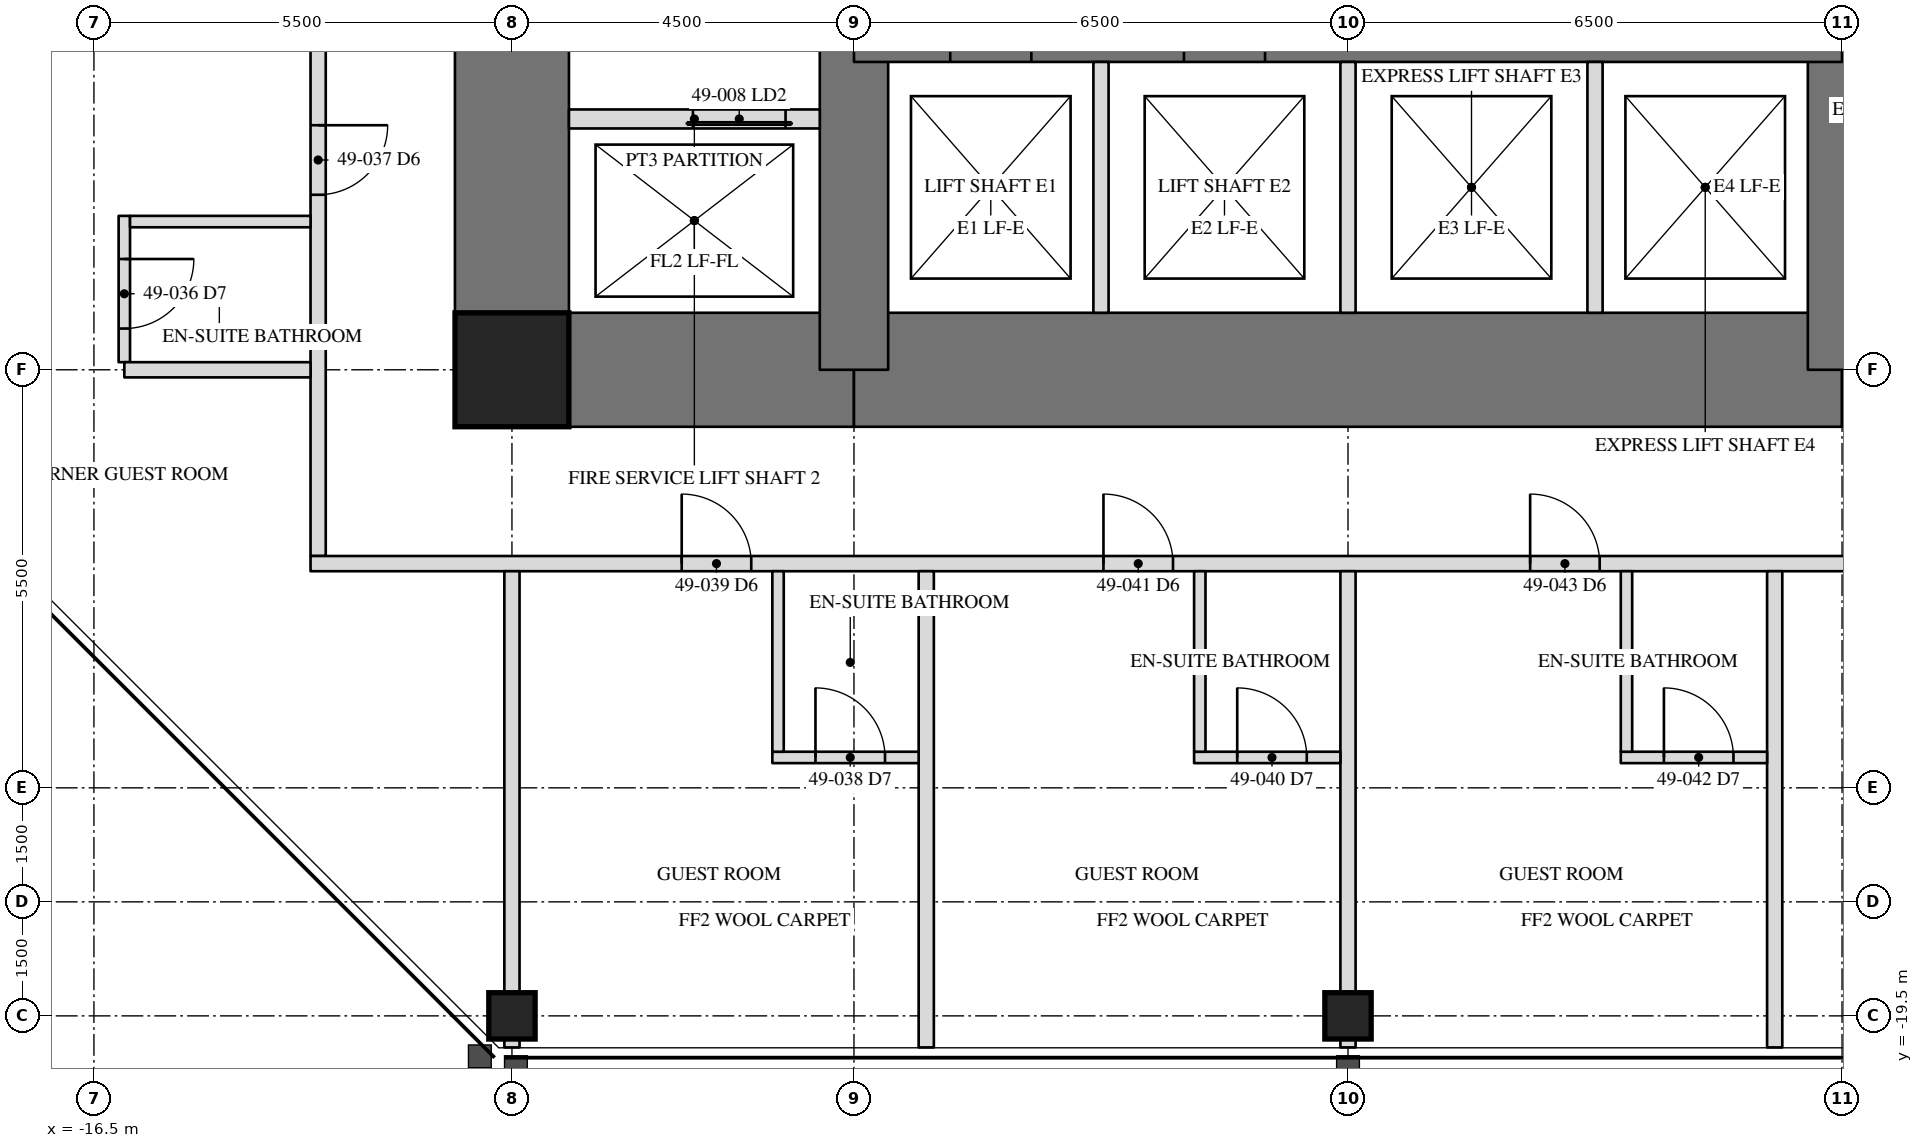
"""IFC4 building model, lengths in metres.
Left out: names, types, materials, properties, quantities, classifications, styles, units other than length and angle.
Written with IfcOpenShell. Run it as: python <this file> out.ifc"""

import sys

from ifc_helpers import new_model, si_unit, direction, frame, frame_2d, origin, origin_2d, place, context, subcontext, project, spatial, rectangle, hollow_rectangle, extrude, element, fill, save


model = new_model("IFC4")
c1 = context("Model", 3, precision=1e-05, world=origin(), true_north=direction((0.0, 1.0)))
c2 = subcontext(c1, "Body", "Model", "MODEL_VIEW")
j1 = project(units=[si_unit("LENGTHUNIT", "METRE"), si_unit("PLANEANGLEUNIT", "RADIAN")], contexts=[c1])
p1 = place(None, origin())
s1 = spatial("IfcSite", under=j1, at=p1, CompositionType="ELEMENT")
p2 = place(p1, origin())
s2 = spatial("IfcBuilding", under=s1, at=p2, CompositionType="ELEMENT")
p3 = place(p2, frame((0.0, 0.0, 208.2)))
s3 = spatial("IfcBuildingStorey", under=s2, at=p3, CompositionType="ELEMENT", Elevation=208.2)
for number, where, z_axis, x_axis in (
    (1, (-11.0, -19.5, 0.0), (0.0, 0.0, 1.0), (1.0, 0.0, 0.0)),
    (2, (0.0, -19.5, 0.0), (0.0, 0.0, 1.0), (1.0, 0.0, 0.0)),
):
    element("IfcColumn", number, at=place(p3, frame(where, z_axis=z_axis, x_axis=x_axis)), inside=s3, PredefinedType="COLUMN", context=c2, shape_type="SweptSolid", body=[
        extrude(hollow_rectangle(XDim=0.61, YDim=0.61, WallThickness=0.076, at=origin_2d()), origin(), (0.0, 0.0, 1.0), 3.5),
    ])
p4 = place(p3, frame((-11.0, 11.0, 0.0), z_axis=(0.0, 0.0, 1.0), x_axis=(0.0, -1.0, 0.0)))
e3 = element("IfcWall", 3, at=p4, inside=s3, PredefinedType="SHEAR", context=c2, shape_type="SweptSolid", body=[
    extrude(rectangle(XDim=22.0, YDim=1.5, at=frame_2d((11.0, 0.0))), origin(), (0.0, 0.0, 1.0), 3.5),
])
p5 = place(p4, frame((15.393, 0.0, 0.0)))
e4 = element("IfcOpeningElement", 4, at=p5, cuts=e3, PredefinedType="OPENING", context=c2, shape_type="SweptSolid", body=[
    extrude(rectangle(XDim=0.915, YDim=2.134, at=frame_2d((0.458, 1.067))), frame((0.0, 0.76, 0.0), z_axis=(0.0, -1.0, 0.0), x_axis=(1.0, 0.0, 0.0)), (0.0, 0.0, 1.0), 1.52),
])
p6 = place(p3, frame((-11.0, -11.0, 0.0), z_axis=(0.0, 0.0, 1.0), x_axis=(1.0, 0.0, 0.0)))
e5 = element("IfcWall", 5, at=p6, inside=s3, PredefinedType="SHEAR", context=c2, shape_type="SweptSolid", body=[
    extrude(rectangle(XDim=4.5, YDim=1.5, at=frame_2d((2.25, 0.0))), origin(), (0.0, 0.0, 1.0), 3.5),
])
p7 = place(p3, frame((-6.5, -11.0, 0.0), z_axis=(0.0, 0.0, 1.0), x_axis=(1.0, 0.0, 0.0)))
e6 = element("IfcWall", 6, at=p7, inside=s3, PredefinedType="SHEAR", context=c2, shape_type="SweptSolid", body=[
    extrude(rectangle(XDim=13.0, YDim=1.5, at=frame_2d((6.5, 0.0))), origin(), (0.0, 0.0, 1.0), 3.5),
])
p8 = place(p3, frame((6.5, -11.0, 0.0), z_axis=(0.0, 0.0, 1.0), x_axis=(1.0, 0.0, 0.0)))
e7 = element("IfcWall", 7, at=p8, inside=s3, PredefinedType="SHEAR", context=c2, shape_type="SweptSolid", body=[
    extrude(rectangle(XDim=4.5, YDim=1.5, at=frame_2d((2.25, 0.0))), origin(), (0.0, 0.0, 1.0), 3.5),
])
for number, where, z_axis, x_axis in (
    (8, (6.5, -11.0, 0.0), (0.0, 0.0, 1.0), (0.0, 1.0, 0.0)),
    (9, (-6.5, -6.5, 0.0), (0.0, 0.0, 1.0), (0.0, -1.0, 0.0)),
):
    element("IfcWall", number, at=place(p3, frame(where, z_axis=z_axis, x_axis=x_axis)), inside=s3, PredefinedType="SHEAR", context=c2, shape_type="SweptSolid", body=[
        extrude(rectangle(XDim=4.5, YDim=0.9, at=frame_2d((2.25, 0.0))), origin(), (0.0, 0.0, 1.0), 3.5),
    ])
p9 = place(p3, frame((-6.5, -6.5, 0.0), z_axis=(0.0, 0.0, 1.0), x_axis=(1.0, 0.0, 0.0)))
e10 = element("IfcWall", 10, at=p9, inside=s3, PredefinedType="SHEAR", context=c2, shape_type="SweptSolid", body=[
    extrude(rectangle(XDim=13.0, YDim=0.9, at=frame_2d((6.5, 0.0))), origin(), (0.0, 0.0, 1.0), 3.5),
])
p10 = place(p9, frame((1.267, 0.0, 0.0)))
e11 = element("IfcOpeningElement", 11, at=p10, cuts=e10, PredefinedType="OPENING", context=c2, shape_type="SweptSolid", body=[
    extrude(rectangle(XDim=1.067, YDim=2.134, at=frame_2d((0.533, 1.067))), frame((0.0, 0.46, 0.0), z_axis=(0.0, -1.0, 0.0), x_axis=(1.0, 0.0, 0.0)), (0.0, 0.0, 1.0), 0.92),
])
p11 = place(p9, frame((4.342, 0.0, 0.0)))
e12 = element("IfcOpeningElement", 12, at=p11, cuts=e10, PredefinedType="OPENING", context=c2, shape_type="SweptSolid", body=[
    extrude(rectangle(XDim=1.067, YDim=2.134, at=frame_2d((0.533, 1.067))), frame((0.0, 0.46, 0.0), z_axis=(0.0, -1.0, 0.0), x_axis=(1.0, 0.0, 0.0)), (0.0, 0.0, 1.0), 0.92),
])
p12 = place(p3, frame((-11.0, -11.0, 0.0), z_axis=(0.0, 0.0, 1.0), x_axis=(1.0, 0.0, 0.0)))
e13 = element("IfcColumn", 13, at=p12, inside=s3, PredefinedType="COLUMN", context=c2, shape_type="SweptSolid", body=[
    extrude(hollow_rectangle(XDim=1.499, YDim=1.499, WallThickness=0.102, at=origin_2d()), origin(), (0.0, 0.0, 1.0), 3.5),
])
p13 = place(p3, frame((-6.95, -7.7, 0.0), z_axis=(0.0, 0.0, 1.0), x_axis=(-1.0, 0.0, 0.0)))
e14 = element("IfcWall", 14, at=p13, inside=s3, PredefinedType="PARTITIONING", context=c2, shape_type="SweptSolid", body=[
    extrude(rectangle(XDim=3.3, YDim=0.25, at=frame_2d((1.65, 0.0))), origin(), (0.0, 0.0, 1.0), 3.31),
])
p14 = place(p13, frame((0.45, 0.0, 0.0)))
e15 = element("IfcOpeningElement", 15, at=p14, cuts=e14, PredefinedType="OPENING", context=c2, shape_type="SweptSolid", body=[
    extrude(rectangle(XDim=1.219, YDim=2.134, at=frame_2d((0.609, 1.067))), frame((0.0, 0.135, 0.0), z_axis=(0.0, -1.0, 0.0), x_axis=(1.0, 0.0, 0.0)), (0.0, 0.0, 1.0), 0.27),
])
for number, where, z_axis, x_axis in (
    (16, (-3.25, -10.25, 0.0), (0.0, 0.0, 1.0), (0.0, 1.0, 0.0)),
    (17, (0.0, -10.25, 0.0), (0.0, 0.0, 1.0), (0.0, 1.0, 0.0)),
    (18, (3.25, -10.25, 0.0), (0.0, 0.0, 1.0), (0.0, 1.0, 0.0)),
):
    element("IfcWall", number, at=place(p3, frame(where, z_axis=z_axis, x_axis=x_axis)), inside=s3, PredefinedType="PARTITIONING", context=c2, shape_type="SweptSolid", body=[
        extrude(rectangle(XDim=3.3, YDim=0.2, at=frame_2d((1.65, 0.0))), origin(), (0.0, 0.0, 1.0), 3.31),
    ])
p15 = place(p3, frame((-13.55, 13.65, 0.0), z_axis=(0.0, 0.0, 1.0), x_axis=(0.0, -1.0, 0.0)))
e19 = element("IfcWall", 19, at=p15, inside=s3, PredefinedType="PARTITIONING", context=c2, shape_type="SweptSolid", body=[
    extrude(rectangle(XDim=27.1, YDim=0.2, at=frame_2d((13.55, 0.0))), origin(), (0.0, 0.0, 1.0), 3.31),
])
p16 = place(p15, frame((4.884, 0.0, 0.0)))
e20 = element("IfcOpeningElement", 20, at=p16, cuts=e19, PredefinedType="OPENING", context=c2, shape_type="SweptSolid", body=[
    extrude(rectangle(XDim=0.915, YDim=2.134, at=frame_2d((0.458, 1.067))), frame((0.0, 0.11, 0.0), z_axis=(0.0, -1.0, 0.0), x_axis=(1.0, 0.0, 0.0)), (0.0, 0.0, 1.0), 0.22),
])
p17 = place(p15, frame((10.433, 0.0, 0.0)))
e21 = element("IfcOpeningElement", 21, at=p17, cuts=e19, PredefinedType="OPENING", context=c2, shape_type="SweptSolid", body=[
    extrude(rectangle(XDim=0.915, YDim=2.134, at=frame_2d((0.458, 1.067))), frame((0.0, 0.11, 0.0), z_axis=(0.0, -1.0, 0.0), x_axis=(1.0, 0.0, 0.0)), (0.0, 0.0, 1.0), 0.22),
])
p18 = place(p15, frame((16.046, 0.0, 0.0)))
e22 = element("IfcOpeningElement", 22, at=p18, cuts=e19, PredefinedType="OPENING", context=c2, shape_type="SweptSolid", body=[
    extrude(rectangle(XDim=0.915, YDim=2.134, at=frame_2d((0.458, 1.067))), frame((0.0, 0.11, 0.0), z_axis=(0.0, -1.0, 0.0), x_axis=(1.0, 0.0, 0.0)), (0.0, 0.0, 1.0), 0.22),
])
p19 = place(p15, frame((21.433, 0.0, 0.0)))
e23 = element("IfcOpeningElement", 23, at=p19, cuts=e19, PredefinedType="OPENING", context=c2, shape_type="SweptSolid", body=[
    extrude(rectangle(XDim=0.915, YDim=2.134, at=frame_2d((0.458, 1.067))), frame((0.0, 0.11, 0.0), z_axis=(0.0, -1.0, 0.0), x_axis=(1.0, 0.0, 0.0)), (0.0, 0.0, 1.0), 0.22),
])
p20 = place(p3, frame((-13.65, -13.55, 0.0), z_axis=(0.0, 0.0, 1.0), x_axis=(1.0, 0.0, 0.0)))
e24 = element("IfcWall", 24, at=p20, inside=s3, PredefinedType="PARTITIONING", context=c2, shape_type="SweptSolid", body=[
    extrude(rectangle(XDim=27.1, YDim=0.2, at=frame_2d((13.55, 0.0))), origin(), (0.0, 0.0, 1.0), 3.31),
])
p21 = place(p20, frame((4.884, 0.0, 0.0)))
e25 = element("IfcOpeningElement", 25, at=p21, cuts=e24, PredefinedType="OPENING", context=c2, shape_type="SweptSolid", body=[
    extrude(rectangle(XDim=0.915, YDim=2.134, at=frame_2d((0.458, 1.067))), frame((0.0, 0.11, 0.0), z_axis=(0.0, -1.0, 0.0), x_axis=(1.0, 0.0, 0.0)), (0.0, 0.0, 1.0), 0.22),
])
p22 = place(p20, frame((10.433, 0.0, 0.0)))
e26 = element("IfcOpeningElement", 26, at=p22, cuts=e24, PredefinedType="OPENING", context=c2, shape_type="SweptSolid", body=[
    extrude(rectangle(XDim=0.915, YDim=2.134, at=frame_2d((0.458, 1.067))), frame((0.0, 0.11, 0.0), z_axis=(0.0, -1.0, 0.0), x_axis=(1.0, 0.0, 0.0)), (0.0, 0.0, 1.0), 0.22),
])
p23 = place(p20, frame((16.046, 0.0, 0.0)))
e27 = element("IfcOpeningElement", 27, at=p23, cuts=e24, PredefinedType="OPENING", context=c2, shape_type="SweptSolid", body=[
    extrude(rectangle(XDim=0.915, YDim=2.134, at=frame_2d((0.458, 1.067))), frame((0.0, 0.11, 0.0), z_axis=(0.0, -1.0, 0.0), x_axis=(1.0, 0.0, 0.0)), (0.0, 0.0, 1.0), 0.22),
])
p24 = place(p20, frame((21.433, 0.0, 0.0)))
e28 = element("IfcOpeningElement", 28, at=p24, cuts=e24, PredefinedType="OPENING", context=c2, shape_type="SweptSolid", body=[
    extrude(rectangle(XDim=0.915, YDim=2.134, at=frame_2d((0.458, 1.067))), frame((0.0, 0.11, 0.0), z_axis=(0.0, -1.0, 0.0), x_axis=(1.0, 0.0, 0.0)), (0.0, 0.0, 1.0), 0.22),
])
p25 = place(p3, frame((-16.1, -8.975, 0.0), z_axis=(0.0, 0.0, 1.0), x_axis=(0.0, -1.0, 0.0)))
e29 = element("IfcWall", 29, at=p25, inside=s3, PredefinedType="PARTITIONING", context=c2, shape_type="SweptSolid", body=[
    extrude(rectangle(XDim=1.925, YDim=0.15, at=frame_2d((0.962, 0.0))), origin(), (0.0, 0.0, 1.0), 3.31),
])
p26 = place(p25, frame((0.567, 0.0, 0.0)))
e30 = element("IfcOpeningElement", 30, at=p26, cuts=e29, PredefinedType="OPENING", context=c2, shape_type="SweptSolid", body=[
    extrude(rectangle(XDim=0.915, YDim=2.032, at=frame_2d((0.458, 1.016))), frame((0.0, 0.085, 0.0), z_axis=(0.0, -1.0, 0.0), x_axis=(1.0, 0.0, 0.0)), (0.0, 0.0, 1.0), 0.17),
])
p27 = place(p3, frame((-13.65, -9.05, 0.0), z_axis=(0.0, 0.0, 1.0), x_axis=(-1.0, 0.0, 0.0)))
e31 = element("IfcWall", 31, at=p27, inside=s3, PredefinedType="PARTITIONING", context=c2, shape_type="SweptSolid", body=[
    extrude(rectangle(XDim=2.375, YDim=0.15, at=frame_2d((1.188, 0.0))), origin(), (0.0, 0.0, 1.0), 3.31),
])
p28 = place(p3, frame((-13.65, -11.0, 0.0), z_axis=(0.0, 0.0, 1.0), x_axis=(-1.0, 0.0, 0.0)))
e32 = element("IfcWall", 32, at=p28, inside=s3, PredefinedType="PARTITIONING", context=c2, shape_type="SweptSolid", body=[
    extrude(rectangle(XDim=2.45, YDim=0.2, at=frame_2d((1.225, 0.0))), origin(), (0.0, 0.0, 1.0), 2.802),
])
p29 = place(p3, frame((-11.0, -13.65, 0.0), z_axis=(0.0, 0.0, 1.0), x_axis=(0.0, -1.0, 0.0)))
e33 = element("IfcWall", 33, at=p29, inside=s3, PredefinedType="PARTITIONING", context=c2, shape_type="SweptSolid", body=[
    extrude(rectangle(XDim=6.265, YDim=0.2, at=frame_2d((3.133, 0.0))), origin(), (0.0, 0.0, 1.0), 2.802),
])
p30 = place(p3, frame((-5.549, -13.65, 0.0), z_axis=(0.0, 0.0, 1.0), x_axis=(0.0, -1.0, 0.0)))
e34 = element("IfcWall", 34, at=p30, inside=s3, PredefinedType="PARTITIONING", context=c2, shape_type="SweptSolid", body=[
    extrude(rectangle(XDim=6.265, YDim=0.2, at=frame_2d((3.133, 0.0))), origin(), (0.0, 0.0, 1.0), 3.31),
])
p31 = place(p3, frame((0.0, -13.65, 0.0), z_axis=(0.0, 0.0, 1.0), x_axis=(0.0, -1.0, 0.0)))
e35 = element("IfcWall", 35, at=p31, inside=s3, PredefinedType="PARTITIONING", context=c2, shape_type="SweptSolid", body=[
    extrude(rectangle(XDim=6.265, YDim=0.2, at=frame_2d((3.133, 0.0))), origin(), (0.0, 0.0, 1.0), 2.802),
])
p32 = place(p3, frame((5.614, -13.65, 0.0), z_axis=(0.0, 0.0, 1.0), x_axis=(0.0, -1.0, 0.0)))
e36 = element("IfcWall", 36, at=p32, inside=s3, PredefinedType="PARTITIONING", context=c2, shape_type="SweptSolid", body=[
    extrude(rectangle(XDim=6.265, YDim=0.2, at=frame_2d((3.133, 0.0))), origin(), (0.0, 0.0, 1.0), 3.31),
])
p33 = place(p3, frame((-7.574, -16.1, 0.0), z_axis=(0.0, 0.0, 1.0), x_axis=(1.0, 0.0, 0.0)))
e37 = element("IfcWall", 37, at=p33, inside=s3, PredefinedType="PARTITIONING", context=c2, shape_type="SweptSolid", body=[
    extrude(rectangle(XDim=1.925, YDim=0.15, at=frame_2d((0.962, 0.0))), origin(), (0.0, 0.0, 1.0), 3.31),
])
p34 = place(p33, frame((0.567, 0.0, 0.0)))
e38 = element("IfcOpeningElement", 38, at=p34, cuts=e37, PredefinedType="OPENING", context=c2, shape_type="SweptSolid", body=[
    extrude(rectangle(XDim=0.915, YDim=2.032, at=frame_2d((0.458, 1.016))), frame((0.0, 0.085, 0.0), z_axis=(0.0, -1.0, 0.0), x_axis=(1.0, 0.0, 0.0)), (0.0, 0.0, 1.0), 0.17),
])
p35 = place(p3, frame((-7.499, -13.65, 0.0), z_axis=(0.0, 0.0, 1.0), x_axis=(0.0, -1.0, 0.0)))
e39 = element("IfcWall", 39, at=p35, inside=s3, PredefinedType="PARTITIONING", context=c2, shape_type="SweptSolid", body=[
    extrude(rectangle(XDim=2.375, YDim=0.15, at=frame_2d((1.188, 0.0))), origin(), (0.0, 0.0, 1.0), 3.31),
])
p36 = place(p3, frame((-2.025, -16.1, 0.0), z_axis=(0.0, 0.0, 1.0), x_axis=(1.0, 0.0, 0.0)))
e40 = element("IfcWall", 40, at=p36, inside=s3, PredefinedType="PARTITIONING", context=c2, shape_type="SweptSolid", body=[
    extrude(rectangle(XDim=1.925, YDim=0.15, at=frame_2d((0.962, 0.0))), origin(), (0.0, 0.0, 1.0), 3.31),
])
p37 = place(p36, frame((0.567, 0.0, 0.0)))
e41 = element("IfcOpeningElement", 41, at=p37, cuts=e40, PredefinedType="OPENING", context=c2, shape_type="SweptSolid", body=[
    extrude(rectangle(XDim=0.915, YDim=2.032, at=frame_2d((0.458, 1.016))), frame((0.0, 0.085, 0.0), z_axis=(0.0, -1.0, 0.0), x_axis=(1.0, 0.0, 0.0)), (0.0, 0.0, 1.0), 0.17),
])
p38 = place(p3, frame((-1.95, -13.65, 0.0), z_axis=(0.0, 0.0, 1.0), x_axis=(0.0, -1.0, 0.0)))
e42 = element("IfcWall", 42, at=p38, inside=s3, PredefinedType="PARTITIONING", context=c2, shape_type="SweptSolid", body=[
    extrude(rectangle(XDim=2.375, YDim=0.15, at=frame_2d((1.188, 0.0))), origin(), (0.0, 0.0, 1.0), 3.31),
])
p39 = place(p3, frame((3.589, -16.1, 0.0), z_axis=(0.0, 0.0, 1.0), x_axis=(1.0, 0.0, 0.0)))
e43 = element("IfcWall", 43, at=p39, inside=s3, PredefinedType="PARTITIONING", context=c2, shape_type="SweptSolid", body=[
    extrude(rectangle(XDim=1.925, YDim=0.15, at=frame_2d((0.962, 0.0))), origin(), (0.0, 0.0, 1.0), 3.31),
])
p40 = place(p39, frame((0.567, 0.0, 0.0)))
e44 = element("IfcOpeningElement", 44, at=p40, cuts=e43, PredefinedType="OPENING", context=c2, shape_type="SweptSolid", body=[
    extrude(rectangle(XDim=0.915, YDim=2.032, at=frame_2d((0.458, 1.016))), frame((0.0, 0.085, 0.0), z_axis=(0.0, -1.0, 0.0), x_axis=(1.0, 0.0, 0.0)), (0.0, 0.0, 1.0), 0.17),
])
p41 = place(p3, frame((3.664, -13.65, 0.0), z_axis=(0.0, 0.0, 1.0), x_axis=(0.0, -1.0, 0.0)))
e45 = element("IfcWall", 45, at=p41, inside=s3, PredefinedType="PARTITIONING", context=c2, shape_type="SweptSolid", body=[
    extrude(rectangle(XDim=2.375, YDim=0.15, at=frame_2d((1.188, 0.0))), origin(), (0.0, 0.0, 1.0), 2.703),
])
p42 = place(p14, origin())
e46 = element("IfcDoor", 46, at=p42, inside=s3, OperationType="SLIDING_TO_LEFT", PredefinedType="DOOR", context=c2, shape_type="SweptSolid", body=[
    extrude(rectangle(XDim=1.219, YDim=2.134, at=frame_2d((0.609, 1.067))), frame((0.0, 0.025, 0.0), z_axis=(0.0, -1.0, 0.0), x_axis=(1.0, 0.0, 0.0)), (0.0, 0.0, 1.0), 0.05),
])
fill(e15, e46)
p43 = place(p10, origin())
e47 = element("IfcDoor", 47, at=p43, inside=s3, OperationType="SLIDING_TO_LEFT", PredefinedType="DOOR", context=c2, shape_type="SweptSolid", body=[
    extrude(rectangle(XDim=1.067, YDim=2.134, at=frame_2d((0.533, 1.067))), frame((0.0, -0.375, 0.0), z_axis=(0.0, -1.0, 0.0), x_axis=(1.0, 0.0, 0.0)), (0.0, 0.0, 1.0), 0.05),
])
fill(e11, e47)
p44 = place(p11, origin())
e48 = element("IfcDoor", 48, at=p44, inside=s3, OperationType="SLIDING_TO_LEFT", PredefinedType="DOOR", context=c2, shape_type="SweptSolid", body=[
    extrude(rectangle(XDim=1.067, YDim=2.134, at=frame_2d((0.533, 1.067))), frame((0.0, -0.375, 0.0), z_axis=(0.0, -1.0, 0.0), x_axis=(1.0, 0.0, 0.0)), (0.0, 0.0, 1.0), 0.05),
])
fill(e12, e48)
p45 = place(p26, origin())
e49 = element("IfcDoor", 49, at=p45, inside=s3, OperationType="SINGLE_SWING_LEFT", PredefinedType="DOOR", context=c2, shape_type="SweptSolid", body=[
    extrude(rectangle(XDim=0.915, YDim=2.032, at=frame_2d((0.458, 1.016))), frame((0.0, 0.025, 0.0), z_axis=(0.0, -1.0, 0.0), x_axis=(1.0, 0.0, 0.0)), (0.0, 0.0, 1.0), 0.05),
])
fill(e30, e49)
p46 = place(p19, origin())
e50 = element("IfcDoor", 50, at=p46, inside=s3, OperationType="SINGLE_SWING_LEFT", PredefinedType="DOOR", context=c2, shape_type="SweptSolid", body=[
    extrude(rectangle(XDim=0.915, YDim=2.134, at=frame_2d((0.458, 1.067))), frame((0.0, 0.025, 0.0), z_axis=(0.0, -1.0, 0.0), x_axis=(1.0, 0.0, 0.0)), (0.0, 0.0, 1.0), 0.05),
])
fill(e23, e50)
p47 = place(p34, origin())
e51 = element("IfcDoor", 51, at=p47, inside=s3, OperationType="SINGLE_SWING_LEFT", PredefinedType="DOOR", context=c2, shape_type="SweptSolid", body=[
    extrude(rectangle(XDim=0.915, YDim=2.032, at=frame_2d((0.458, 1.016))), frame((0.0, 0.025, 0.0), z_axis=(0.0, -1.0, 0.0), x_axis=(1.0, 0.0, 0.0)), (0.0, 0.0, 1.0), 0.05),
])
fill(e38, e51)
p48 = place(p21, origin())
e52 = element("IfcDoor", 52, at=p48, inside=s3, OperationType="SINGLE_SWING_LEFT", PredefinedType="DOOR", context=c2, shape_type="SweptSolid", body=[
    extrude(rectangle(XDim=0.915, YDim=2.134, at=frame_2d((0.458, 1.067))), frame((0.0, 0.025, 0.0), z_axis=(0.0, -1.0, 0.0), x_axis=(1.0, 0.0, 0.0)), (0.0, 0.0, 1.0), 0.05),
])
fill(e25, e52)
p49 = place(p37, origin())
e53 = element("IfcDoor", 53, at=p49, inside=s3, OperationType="SINGLE_SWING_LEFT", PredefinedType="DOOR", context=c2, shape_type="SweptSolid", body=[
    extrude(rectangle(XDim=0.915, YDim=2.032, at=frame_2d((0.458, 1.016))), frame((0.0, 0.025, 0.0), z_axis=(0.0, -1.0, 0.0), x_axis=(1.0, 0.0, 0.0)), (0.0, 0.0, 1.0), 0.05),
])
fill(e41, e53)
p50 = place(p22, origin())
e54 = element("IfcDoor", 54, at=p50, inside=s3, OperationType="SINGLE_SWING_LEFT", PredefinedType="DOOR", context=c2, shape_type="SweptSolid", body=[
    extrude(rectangle(XDim=0.915, YDim=2.134, at=frame_2d((0.458, 1.067))), frame((0.0, 0.025, 0.0), z_axis=(0.0, -1.0, 0.0), x_axis=(1.0, 0.0, 0.0)), (0.0, 0.0, 1.0), 0.05),
])
fill(e26, e54)
p51 = place(p40, origin())
e55 = element("IfcDoor", 55, at=p51, inside=s3, OperationType="SINGLE_SWING_LEFT", PredefinedType="DOOR", context=c2, shape_type="SweptSolid", body=[
    extrude(rectangle(XDim=0.915, YDim=2.032, at=frame_2d((0.458, 1.016))), frame((0.0, 0.025, 0.0), z_axis=(0.0, -1.0, 0.0), x_axis=(1.0, 0.0, 0.0)), (0.0, 0.0, 1.0), 0.05),
])
fill(e44, e55)
p52 = place(p23, origin())
e56 = element("IfcDoor", 56, at=p52, inside=s3, OperationType="SINGLE_SWING_LEFT", PredefinedType="DOOR", context=c2, shape_type="SweptSolid", body=[
    extrude(rectangle(XDim=0.915, YDim=2.134, at=frame_2d((0.458, 1.067))), frame((0.0, 0.025, 0.0), z_axis=(0.0, -1.0, 0.0), x_axis=(1.0, 0.0, 0.0)), (0.0, 0.0, 1.0), 0.05),
])
fill(e27, e56)
save(model, sys.argv[1])
